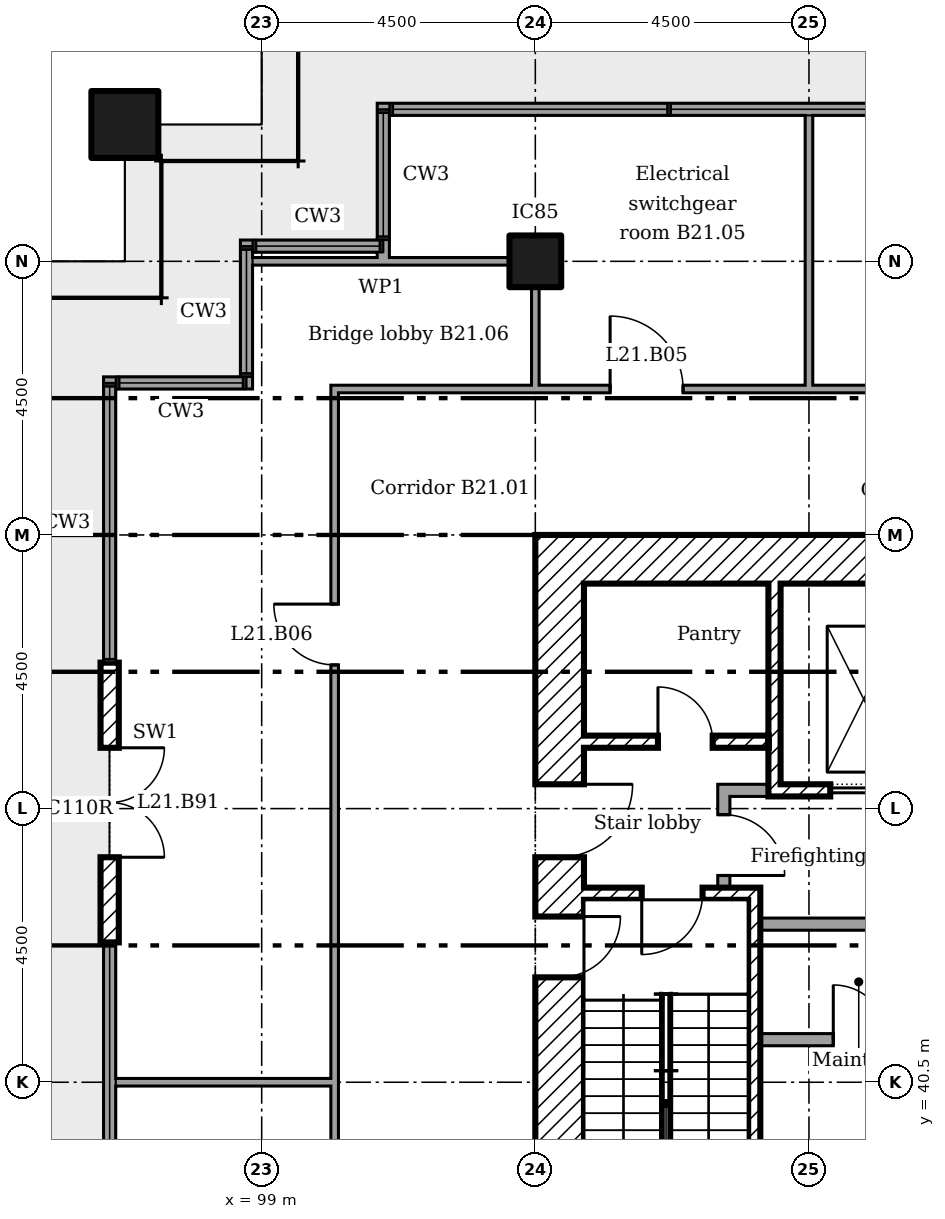
"""IFC4 building model, lengths in metres.
Left out: names, types, materials, properties, quantities, classifications, styles, units other than length and angle.
Written with IfcOpenShell. Run it as: python <this file> out.ifc"""

import sys

from ifc_helpers import new_model, si_unit, direction, frame, frame_2d, origin, origin_2d, place, context, subcontext, project, spatial, rectangle, extrude, element, fill, save


model = new_model("IFC4")
c1 = context("Model", 3, precision=1e-05, world=origin(), true_north=direction((0.0, 1.0)))
c2 = subcontext(c1, "Body", "Model", "MODEL_VIEW")
j1 = project(units=[si_unit("LENGTHUNIT", "METRE"), si_unit("PLANEANGLEUNIT", "RADIAN")], contexts=[c1])
p1 = place(None, origin())
s1 = spatial("IfcSite", under=j1, at=p1, CompositionType="ELEMENT")
p2 = place(p1, origin())
s2 = spatial("IfcBuilding", under=s1, at=p2, CompositionType="ELEMENT")
p3 = place(p2, frame((0.0, 0.0, 87.0)))
s3 = spatial("IfcBuildingStorey", under=s2, at=p3, CompositionType="ELEMENT", Elevation=87.0)
p4 = place(p3, frame((96.75, 56.25, 0.0)))
e1 = element("IfcColumn", 1, at=p4, inside=s3, PredefinedType="COLUMN", context=c2, shape_type="SweptSolid", body=[
    extrude(rectangle(XDim=1.1, YDim=1.1, at=origin_2d()), origin(), (0.0, 0.0, 1.0), 5.0),
])
p5 = place(p3, frame((103.5, 54.0, 0.0)))
e2 = element("IfcColumn", 2, at=p5, inside=s3, PredefinedType="COLUMN", context=c2, shape_type="SweptSolid", body=[
    extrude(rectangle(XDim=0.85, YDim=0.85, at=origin_2d()), origin(), (0.0, 0.0, 1.0), 5.0),
])
p6 = place(p3, frame((98.85, 52.0, 0.0), z_axis=(0.0, 0.0, 1.0), x_axis=(-1.0, 0.0, 0.0)))
e3 = element("IfcWall", 3, at=p6, inside=s3, PredefinedType="ELEMENTEDWALL", context=c2, shape_type="SweptSolid", body=[
    extrude(rectangle(XDim=2.45, YDim=0.2, at=frame_2d((1.225, 0.0))), origin(), (0.0, 0.0, 1.0), 1.8),
])
p7 = place(p3, frame((96.5, 51.9, 0.0), z_axis=(0.0, 0.0, 1.0), x_axis=(0.0, -1.0, 0.0)))
e4 = element("IfcWall", 4, at=p7, inside=s3, PredefinedType="ELEMENTEDWALL", context=c2, shape_type="SweptSolid", body=[
    extrude(rectangle(XDim=4.5, YDim=0.2, at=frame_2d((2.25, 0.0))), origin(), (0.0, 0.0, 1.0), 1.8),
])
p8 = place(p3, frame((96.5, 42.8, 0.0), z_axis=(0.0, 0.0, 1.0), x_axis=(0.0, -1.0, 0.0)))
e5 = element("IfcWall", 5, at=p8, inside=s3, PredefinedType="ELEMENTEDWALL", context=c2, shape_type="SweptSolid", body=[
    extrude(rectangle(XDim=9.4, YDim=0.2, at=frame_2d((4.7, 0.0))), origin(), (0.0, 0.0, 1.0), 1.8),
])
p9 = place(p3, frame((96.5, 47.4, 0.0), z_axis=(0.0, 0.0, 1.0), x_axis=(0.0, -1.0, 0.0)))
e6 = element("IfcWall", 6, at=p9, inside=s3, PredefinedType="ELEMENTEDWALL", context=c2, shape_type="SweptSolid", body=[
    extrude(rectangle(XDim=4.6, YDim=0.3, at=frame_2d((2.3, 0.0))), origin(), (0.0, 0.0, 1.0), 4.85),
])
p10 = place(p9, frame((1.4, 0.0, 0.0)))
e7 = element("IfcOpeningElement", 7, at=p10, cuts=e6, PredefinedType="OPENING", context=c2, shape_type="SweptSolid", body=[
    extrude(rectangle(XDim=1.8, YDim=2.4, at=frame_2d((0.9, 1.2))), frame((0.0, 0.16, 0.0), z_axis=(0.0, -1.0, 0.0), x_axis=(1.0, 0.0, 0.0)), (0.0, 0.0, 1.0), 0.32),
])
p11 = place(p3, frame((119.4, 56.5, 0.0), z_axis=(0.0, 0.0, 1.0), x_axis=(-1.0, 0.0, 0.0)))
e8 = element("IfcWall", 8, at=p11, inside=s3, PredefinedType="ELEMENTEDWALL", context=c2, shape_type="SweptSolid", body=[
    extrude(rectangle(XDim=18.5, YDim=0.2, at=frame_2d((9.25, 0.0))), origin(), (0.0, 0.0, 1.0), 1.8),
])
p12 = place(p3, frame((101.0, 56.4, 0.0), z_axis=(0.0, 0.0, 1.0), x_axis=(0.0, -1.0, 0.0)))
e9 = element("IfcWall", 9, at=p12, inside=s3, PredefinedType="ELEMENTEDWALL", context=c2, shape_type="SweptSolid", body=[
    extrude(rectangle(XDim=2.337, YDim=0.2, at=frame_2d((1.169, 0.0))), origin(), (0.0, 0.0, 1.0), 1.8),
])
p13 = place(p3, frame((100.9, 54.25, 0.0), z_axis=(0.0, 0.0, 1.0), x_axis=(-1.0, 0.0, 0.0)))
e10 = element("IfcWall", 10, at=p13, inside=s3, PredefinedType="ELEMENTEDWALL", context=c2, shape_type="SweptSolid", body=[
    extrude(rectangle(XDim=2.25, YDim=0.2, at=frame_2d((1.125, 0.0))), origin(), (0.0, 0.0, 1.0), 1.8),
])
p14 = place(p3, frame((98.75, 54.15, 0.0), z_axis=(0.0, 0.0, 1.0), x_axis=(0.0, -1.0, 0.0)))
e11 = element("IfcWall", 11, at=p14, inside=s3, PredefinedType="ELEMENTEDWALL", context=c2, shape_type="SweptSolid", body=[
    extrude(rectangle(XDim=2.05, YDim=0.2, at=frame_2d((1.025, 0.0))), origin(), (0.0, 0.0, 1.0), 1.8),
])
p15 = place(p3, frame((104.3, 49.1, 0.0)))
e12 = element("IfcWall", 12, at=p15, inside=s3, PredefinedType="SHEAR", context=c2, shape_type="SweptSolid", body=[
    extrude(rectangle(XDim=11.9, YDim=0.8, at=frame_2d((5.95, 0.0))), origin(), (0.0, 0.0, 1.0), 4.75),
])
p16 = place(p3, frame((103.9, 36.0, 0.0), z_axis=(0.0, 0.0, 1.0), x_axis=(0.0, 1.0, 0.0)))
e13 = element("IfcWall", 13, at=p16, inside=s3, PredefinedType="SHEAR", context=c2, shape_type="SweptSolid", body=[
    extrude(rectangle(XDim=13.5, YDim=0.8, at=frame_2d((6.75, 0.0))), origin(), (0.0, 0.0, 1.0), 4.75),
])
p17 = place(p16, frame((8.2, 0.0, 0.0)))
e14 = element("IfcOpeningElement", 14, at=p17, cuts=e13, PredefinedType="OPENING", context=c2, shape_type="SweptSolid", body=[
    extrude(rectangle(XDim=1.2, YDim=2.1, at=frame_2d((0.6, 1.05))), frame((0.0, 0.41, 0.0), z_axis=(0.0, -1.0, 0.0), x_axis=(1.0, 0.0, 0.0)), (0.0, 0.0, 1.0), 0.82),
])
p18 = place(p16, frame((6.225, 0.0, 0.0)))
e15 = element("IfcOpeningElement", 15, at=p18, cuts=e13, PredefinedType="OPENING", context=c2, shape_type="SweptSolid", body=[
    extrude(rectangle(XDim=1.0, YDim=2.1, at=frame_2d((0.5, 1.05))), frame((0.0, 0.41, 0.0), z_axis=(0.0, -1.0, 0.0), x_axis=(1.0, 0.0, 0.0)), (0.0, 0.0, 1.0), 0.82),
])
p19 = place(p3, frame((107.433, 48.7, 0.0), z_axis=(0.0, 0.0, 1.0), x_axis=(0.0, -1.0, 0.0)))
e16 = element("IfcWall", 16, at=p19, inside=s3, PredefinedType="SHEAR", context=c2, shape_type="SweptSolid", body=[
    extrude(rectangle(XDim=3.5, YDim=0.2, at=frame_2d((1.75, 0.0))), origin(), (0.0, 0.0, 1.0), 4.75),
])
p20 = place(p3, frame((106.5, 45.3, 0.0)))
e17 = element("IfcWall", 17, at=p20, inside=s3, PredefinedType="PARTITIONING", context=c2, shape_type="SweptSolid", body=[
    extrude(rectangle(XDim=0.833, YDim=0.2, at=frame_2d((0.417, 0.0))), origin(), (0.0, 0.0, 1.0), 4.75),
])
p21 = place(p3, frame((106.6, 43.7, 0.0), z_axis=(0.0, 0.0, 1.0), x_axis=(0.0, 1.0, 0.0)))
e18 = element("IfcWall", 18, at=p21, inside=s3, PredefinedType="PARTITIONING", context=c2, shape_type="SweptSolid", body=[
    extrude(rectangle(XDim=1.5, YDim=0.2, at=frame_2d((0.75, 0.0))), origin(), (0.0, 0.0, 1.0), 4.75),
])
p22 = place(p21, frame((0.2, 0.0, 0.0)))
e19 = element("IfcOpeningElement", 19, at=p22, cuts=e18, PredefinedType="OPENING", context=c2, shape_type="SweptSolid", body=[
    extrude(rectangle(XDim=1.0, YDim=2.1, at=frame_2d((0.5, 1.05))), frame((0.0, 0.11, 0.0), z_axis=(0.0, -1.0, 0.0), x_axis=(1.0, 0.0, 0.0)), (0.0, 0.0, 1.0), 0.22),
])
p23 = place(p3, frame((104.3, 46.1, 0.0)))
e20 = element("IfcWall", 20, at=p23, inside=s3, PredefinedType="SHEAR", context=c2, shape_type="SweptSolid", body=[
    extrude(rectangle(XDim=3.033, YDim=0.2, at=frame_2d((1.517, 0.0))), origin(), (0.0, 0.0, 1.0), 4.75),
])
p24 = place(p23, frame((1.217, 0.0, 0.0)))
e21 = element("IfcOpeningElement", 21, at=p24, cuts=e20, PredefinedType="OPENING", context=c2, shape_type="SweptSolid", body=[
    extrude(rectangle(XDim=0.9, YDim=2.1, at=frame_2d((0.45, 1.05))), frame((0.0, 0.11, 0.0), z_axis=(0.0, -1.0, 0.0), x_axis=(1.0, 0.0, 0.0)), (0.0, 0.0, 1.0), 0.22),
])
p25 = place(p3, frame((107.533, 45.3, 0.0)))
e22 = element("IfcWall", 22, at=p25, inside=s3, PredefinedType="SHEAR", context=c2, shape_type="SweptSolid", body=[
    extrude(rectangle(XDim=2.733, YDim=0.2, at=frame_2d((1.367, 0.0))), origin(), (0.0, 0.0, 1.0), 4.75),
])
p26 = place(p25, frame((0.817, 0.0, 0.0)))
e23 = element("IfcOpeningElement", 23, at=p26, cuts=e22, PredefinedType="OPENING", context=c2, shape_type="SweptSolid", body=[
    extrude(rectangle(XDim=1.1, YDim=2.1, at=frame_2d((0.55, 1.05))), frame((0.0, 0.11, 0.0), z_axis=(0.0, -1.0, 0.0), x_axis=(1.0, 0.0, 0.0)), (0.0, 0.0, 1.0), 0.22),
])
p27 = place(p3, frame((107.1, 36.8, 0.0), z_axis=(0.0, 0.0, 1.0), x_axis=(0.0, 1.0, 0.0)))
e24 = element("IfcWall", 24, at=p27, inside=s3, PredefinedType="SHEAR", context=c2, shape_type="SweptSolid", body=[
    extrude(rectangle(XDim=6.9, YDim=0.2, at=frame_2d((3.45, 0.0))), origin(), (0.0, 0.0, 1.0), 4.75),
])
p28 = place(p3, frame((104.3, 43.6, 0.0)))
e25 = element("IfcWall", 25, at=p28, inside=s3, PredefinedType="SHEAR", context=c2, shape_type="SweptSolid", body=[
    extrude(rectangle(XDim=2.7, YDim=0.2, at=frame_2d((1.35, 0.0))), origin(), (0.0, 0.0, 1.0), 4.75),
])
p29 = place(p28, frame((0.95, 0.0, 0.0)))
e26 = element("IfcOpeningElement", 26, at=p29, cuts=e25, PredefinedType="OPENING", context=c2, shape_type="SweptSolid", body=[
    extrude(rectangle(XDim=1.0, YDim=2.1, at=frame_2d((0.5, 1.05))), frame((0.0, 0.11, 0.0), z_axis=(0.0, -1.0, 0.0), x_axis=(1.0, 0.0, 0.0)), (0.0, 0.0, 1.0), 0.22),
])
p30 = place(p3, frame((107.2, 43.1, 0.0)))
e27 = element("IfcWall", 27, at=p30, inside=s3, PredefinedType="PARTITIONING", context=c2, shape_type="SweptSolid", body=[
    extrude(rectangle(XDim=6.1, YDim=0.2, at=frame_2d((3.05, 0.0))), origin(), (0.0, 0.0, 1.0), 4.75),
])
p31 = place(p30, frame((4.259, 0.0, 0.0)))
e28 = element("IfcOpeningElement", 28, at=p31, cuts=e27, PredefinedType="OPENING", context=c2, shape_type="SweptSolid", body=[
    extrude(rectangle(XDim=0.9, YDim=2.1, at=frame_2d((0.45, 1.05))), frame((0.0, 0.11, 0.0), z_axis=(0.0, -1.0, 0.0), x_axis=(1.0, 0.0, 0.0)), (0.0, 0.0, 1.0), 0.22),
])
p32 = place(p3, frame((107.2, 41.2, 0.0)))
e29 = element("IfcWall", 29, at=p32, inside=s3, PredefinedType="PARTITIONING", context=c2, shape_type="SweptSolid", body=[
    extrude(rectangle(XDim=6.1, YDim=0.2, at=frame_2d((3.05, 0.0))), origin(), (0.0, 0.0, 1.0), 4.75),
])
p33 = place(p32, frame((1.2, 0.0, 0.0)))
e30 = element("IfcOpeningElement", 30, at=p33, cuts=e29, PredefinedType="OPENING", context=c2, shape_type="SweptSolid", body=[
    extrude(rectangle(XDim=0.9, YDim=2.1, at=frame_2d((0.45, 1.05))), frame((0.0, 0.11, 0.0), z_axis=(0.0, -1.0, 0.0), x_axis=(1.0, 0.0, 0.0)), (0.0, 0.0, 1.0), 0.22),
])
p34 = place(p3, frame((96.6, 40.5, 0.0)))
e31 = element("IfcWall", 31, at=p34, inside=s3, PredefinedType="PARTITIONING", context=c2, shape_type="SweptSolid", body=[
    extrude(rectangle(XDim=3.6, YDim=0.125, at=frame_2d((1.8, 0.0))), origin(), (0.0, 0.0, 1.0), 4.251),
])
p35 = place(p3, frame((100.137, 51.9, 0.0)))
e32 = element("IfcWall", 32, at=p35, inside=s3, PredefinedType="PARTITIONING", context=c2, shape_type="SweptSolid", body=[
    extrude(rectangle(XDim=19.925, YDim=0.125, at=frame_2d((9.962, 0.0))), origin(), (0.0, 0.0, 1.0), 4.85),
])
p36 = place(p35, frame((12.962, 0.0, 0.0)))
e33 = element("IfcOpeningElement", 33, at=p36, cuts=e32, PredefinedType="OPENING", context=c2, shape_type="SweptSolid", body=[
    extrude(rectangle(XDim=1.2, YDim=2.1, at=frame_2d((0.6, 1.05))), frame((0.0, 0.073, 0.0), z_axis=(0.0, -1.0, 0.0), x_axis=(1.0, 0.0, 0.0)), (0.0, 0.0, 1.0), 0.145),
])
p37 = place(p35, frame((4.593, 0.0, 0.0)))
e34 = element("IfcOpeningElement", 34, at=p37, cuts=e32, PredefinedType="OPENING", context=c2, shape_type="SweptSolid", body=[
    extrude(rectangle(XDim=1.2, YDim=2.1, at=frame_2d((0.6, 1.05))), frame((0.0, 0.073, 0.0), z_axis=(0.0, -1.0, 0.0), x_axis=(1.0, 0.0, 0.0)), (0.0, 0.0, 1.0), 0.145),
])
p38 = place(p3, frame((98.85, 54.0, 0.0)))
e35 = element("IfcWall", 35, at=p38, inside=s3, PredefinedType="PARTITIONING", context=c2, shape_type="SweptSolid", body=[
    extrude(rectangle(XDim=4.225, YDim=0.125, at=frame_2d((2.112, 0.0))), origin(), (0.0, 0.0, 1.0), 4.321),
])
p39 = place(p3, frame((100.2, 33.962, 0.0), z_axis=(0.0, 0.0, 1.0), x_axis=(0.0, 1.0, 0.0)))
e36 = element("IfcWall", 36, at=p39, inside=s3, PredefinedType="PARTITIONING", context=c2, shape_type="SweptSolid", body=[
    extrude(rectangle(XDim=17.875, YDim=0.125, at=frame_2d((8.938, 0.0))), origin(), (0.0, 0.0, 1.0), 4.85),
])
p40 = place(p39, frame((13.4, 0.0, 0.0)))
e37 = element("IfcOpeningElement", 37, at=p40, cuts=e36, PredefinedType="OPENING", context=c2, shape_type="SweptSolid", body=[
    extrude(rectangle(XDim=1.0, YDim=2.1, at=frame_2d((0.5, 1.05))), frame((0.0, 0.073, 0.0), z_axis=(0.0, -1.0, 0.0), x_axis=(1.0, 0.0, 0.0)), (0.0, 0.0, 1.0), 0.145),
])
p41 = place(p3, frame((103.5, 51.9, 0.0), z_axis=(0.0, 0.0, 1.0), x_axis=(0.0, 1.0, 0.0)))
e38 = element("IfcWall", 38, at=p41, inside=s3, PredefinedType="PARTITIONING", context=c2, shape_type="SweptSolid", body=[
    extrude(rectangle(XDim=1.675, YDim=0.125, at=frame_2d((0.837, 0.0))), origin(), (0.0, 0.0, 1.0), 3.8),
])
p42 = place(p3, frame((108.0, 51.9, 0.0), z_axis=(0.0, 0.0, 1.0), x_axis=(0.0, 1.0, 0.0)))
e39 = element("IfcWall", 39, at=p42, inside=s3, PredefinedType="PARTITIONING", context=c2, shape_type="SweptSolid", body=[
    extrude(rectangle(XDim=4.5, YDim=0.125, at=frame_2d((2.25, 0.0))), origin(), (0.0, 0.0, 1.0), 4.162),
])
p43 = place(p10, origin())
e40 = element("IfcDoor", 40, at=p43, inside=s3, OperationType="DOUBLE_DOOR_DOUBLE_SWING", PredefinedType="NOTDEFINED", context=c2, shape_type="SweptSolid", body=[
    extrude(rectangle(XDim=1.8, YDim=2.4, at=frame_2d((0.9, 1.2))), frame((0.0, 0.025, 0.0), z_axis=(0.0, -1.0, 0.0), x_axis=(1.0, 0.0, 0.0)), (0.0, 0.0, 1.0), 0.05),
])
fill(e7, e40)
p44 = place(p17, frame((1.2, 0.0, 0.0), x_axis=(-1.0, 0.0, 0.0)))
e41 = element("IfcDoor", 41, at=p44, inside=s3, OperationType="SINGLE_SWING_RIGHT", PredefinedType="DOOR", context=c2, shape_type="SweptSolid", body=[
    extrude(rectangle(XDim=1.2, YDim=2.1, at=frame_2d((0.6, 1.05))), frame((0.0, 0.025, 0.0), z_axis=(0.0, -1.0, 0.0), x_axis=(1.0, 0.0, 0.0)), (0.0, 0.0, 1.0), 0.05),
])
fill(e14, e41)
p45 = place(p29, frame((1.0, 0.0, 0.0), x_axis=(-1.0, 0.0, 0.0)))
e42 = element("IfcDoor", 42, at=p45, inside=s3, OperationType="SINGLE_SWING_LEFT", PredefinedType="DOOR", context=c2, shape_type="SweptSolid", body=[
    extrude(rectangle(XDim=1.0, YDim=2.1, at=frame_2d((0.5, 1.05))), frame((0.0, 0.025, 0.0), z_axis=(0.0, -1.0, 0.0), x_axis=(1.0, 0.0, 0.0)), (0.0, 0.0, 1.0), 0.05),
])
fill(e26, e42)
p46 = place(p18, frame((1.0, 0.0, 0.0), x_axis=(-1.0, 0.0, 0.0)))
e43 = element("IfcDoor", 43, at=p46, inside=s3, OperationType="SINGLE_SWING_RIGHT", PredefinedType="DOOR", context=c2, shape_type="SweptSolid", body=[
    extrude(rectangle(XDim=1.0, YDim=2.1, at=frame_2d((0.5, 1.05))), frame((0.0, 0.025, 0.0), z_axis=(0.0, -1.0, 0.0), x_axis=(1.0, 0.0, 0.0)), (0.0, 0.0, 1.0), 0.05),
])
fill(e15, e43)
p47 = place(p22, frame((1.0, 0.0, 0.0), x_axis=(-1.0, 0.0, 0.0)))
e44 = element("IfcDoor", 44, at=p47, inside=s3, OperationType="SINGLE_SWING_LEFT", PredefinedType="DOOR", context=c2, shape_type="SweptSolid", body=[
    extrude(rectangle(XDim=1.0, YDim=2.1, at=frame_2d((0.5, 1.05))), frame((0.0, 0.025, 0.0), z_axis=(0.0, -1.0, 0.0), x_axis=(1.0, 0.0, 0.0)), (0.0, 0.0, 1.0), 0.05),
])
fill(e19, e44)
p48 = place(p24, origin())
e45 = element("IfcDoor", 45, at=p48, inside=s3, OperationType="SINGLE_SWING_RIGHT", PredefinedType="DOOR", context=c2, shape_type="SweptSolid", body=[
    extrude(rectangle(XDim=0.9, YDim=2.1, at=frame_2d((0.45, 1.05))), frame((0.0, 0.025, 0.0), z_axis=(0.0, -1.0, 0.0), x_axis=(1.0, 0.0, 0.0)), (0.0, 0.0, 1.0), 0.05),
])
fill(e21, e45)
p49 = place(p33, origin())
e46 = element("IfcDoor", 46, at=p49, inside=s3, OperationType="SINGLE_SWING_RIGHT", PredefinedType="DOOR", context=c2, shape_type="SweptSolid", body=[
    extrude(rectangle(XDim=0.9, YDim=2.1, at=frame_2d((0.45, 1.05))), frame((0.0, 0.025, 0.0), z_axis=(0.0, -1.0, 0.0), x_axis=(1.0, 0.0, 0.0)), (0.0, 0.0, 1.0), 0.05),
])
fill(e30, e46)
p50 = place(p26, origin())
e47 = element("IfcDoor", 47, at=p50, inside=s3, OperationType="SLIDING_TO_LEFT", PredefinedType="DOOR", context=c2, shape_type="SweptSolid", body=[
    extrude(rectangle(XDim=1.1, YDim=2.1, at=frame_2d((0.55, 1.05))), frame((0.0, 0.025, 0.0), z_axis=(0.0, -1.0, 0.0), x_axis=(1.0, 0.0, 0.0)), (0.0, 0.0, 1.0), 0.05),
])
fill(e23, e47)
p51 = place(p37, origin())
e48 = element("IfcDoor", 48, at=p51, inside=s3, OperationType="SINGLE_SWING_RIGHT", PredefinedType="DOOR", context=c2, shape_type="SweptSolid", body=[
    extrude(rectangle(XDim=1.2, YDim=2.1, at=frame_2d((0.6, 1.05))), frame((0.0, 0.025, 0.0), z_axis=(0.0, -1.0, 0.0), x_axis=(1.0, 0.0, 0.0)), (0.0, 0.0, 1.0), 0.05),
])
fill(e34, e48)
p52 = place(p40, origin())
e49 = element("IfcDoor", 49, at=p52, inside=s3, OperationType="SINGLE_SWING_LEFT", PredefinedType="DOOR", context=c2, shape_type="SweptSolid", body=[
    extrude(rectangle(XDim=1.0, YDim=2.1, at=frame_2d((0.5, 1.05))), frame((0.0, 0.025, 0.0), z_axis=(0.0, -1.0, 0.0), x_axis=(1.0, 0.0, 0.0)), (0.0, 0.0, 1.0), 0.05),
])
fill(e37, e49)
save(model, sys.argv[1])
